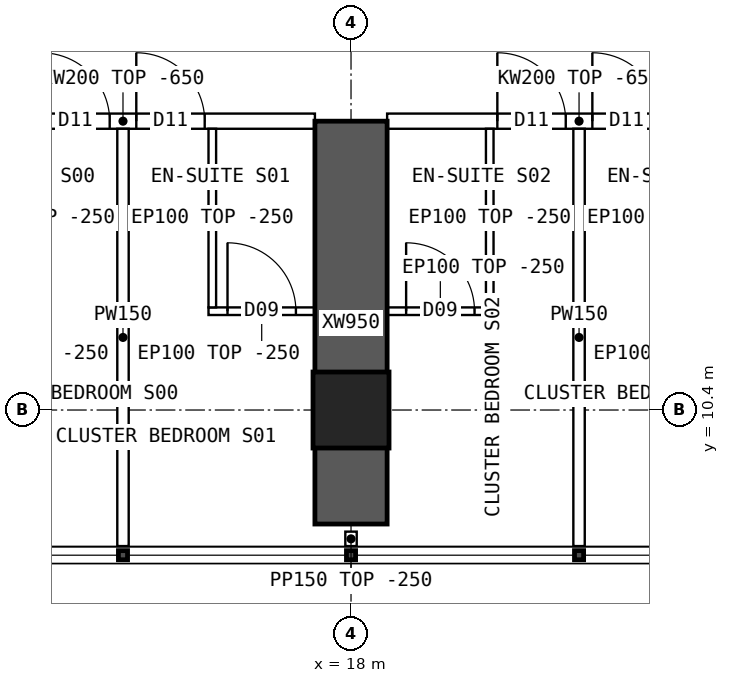
"""IFC4 building model, lengths in metres.
Left out: names, types, materials, properties, quantities, classifications, styles, units other than length and angle.
Written with IfcOpenShell. Run it as: python <this file> out.ifc"""

import sys

from ifc_helpers import new_model, si_unit, direction, frame, frame_2d, origin, origin_2d, place, context, subcontext, project, spatial, polyline, rectangle, hollow_rectangle, outline, extrude, element, fill, save


model = new_model("IFC4")
c1 = context("Model", 3, precision=1e-05, world=origin(), true_north=direction((0.0, 1.0)))
c2 = subcontext(c1, "Body", "Model", "MODEL_VIEW")
j1 = project(units=[si_unit("LENGTHUNIT", "METRE"), si_unit("PLANEANGLEUNIT", "RADIAN")], contexts=[c1])
p1 = place(None, origin())
s1 = spatial("IfcSite", under=j1, at=p1, CompositionType="ELEMENT")
p2 = place(p1, origin())
s2 = spatial("IfcBuilding", under=s1, at=p2, CompositionType="ELEMENT")
p3 = place(p2, frame((0.0, 0.0, 84.4)))
s3 = spatial("IfcBuildingStorey", under=s2, at=p3, CompositionType="ELEMENT", Elevation=84.4)
p4 = place(p3, frame((18.0, 10.4, 0.0), z_axis=(0.0, 0.0, 1.0), x_axis=(1.0, 0.0, 0.0)))
e1 = element("IfcColumn", 1, at=p4, inside=s3, PredefinedType="COLUMN", context=c2, shape_type="SweptSolid", body=[
    extrude(hollow_rectangle(XDim=1.0, YDim=1.0, WallThickness=0.1, at=origin_2d()), origin(), (0.0, 0.0, 1.0), 3.75),
])
p5 = place(p3, frame((18.0, 8.9, 0.0), z_axis=(0.0, 0.0, 1.0), x_axis=(0.0, 1.0, 0.0)))
e2 = element("IfcWall", 2, at=p5, inside=s3, PredefinedType="SHEAR", context=c2, shape_type="SweptSolid", body=[
    extrude(rectangle(XDim=5.3, YDim=0.95, at=frame_2d((2.65, 0.0))), origin(), (0.0, 0.0, 1.0), 3.75),
])
p6 = place(p3, frame((12.475, 14.2, 0.0), z_axis=(0.0, 0.0, 1.0), x_axis=(1.0, 0.0, 0.0)))
e3 = element("IfcWall", 3, at=p6, inside=s3, PredefinedType="SOLIDWALL", context=c2, shape_type="SweptSolid", body=[
    extrude(outline(polyline([(0.0, 0.0), (5.05, 0.0), (5.05, 3.1), (0.0, 3.1), (0.0, 0.0)])), frame((0.0, 0.1, 0.0), z_axis=(0.0, -1.0, 0.0), x_axis=(1.0, 0.0, 0.0)), (0.0, 0.0, 1.0), 0.2),
])
p7 = place(p6, frame((1.45, 0.0, 0.0)))
e4 = element("IfcOpeningElement", 4, at=p7, cuts=e3, PredefinedType="OPENING", context=c2, shape_type="SweptSolid", body=[
    extrude(rectangle(XDim=0.9, YDim=2.1, at=frame_2d((0.45, 1.05))), frame((0.0, 0.11, 0.0), z_axis=(0.0, -1.0, 0.0), x_axis=(1.0, 0.0, 0.0)), (0.0, 0.0, 1.0), 0.22),
])
p8 = place(p6, frame((2.7, 0.0, 0.0)))
e5 = element("IfcOpeningElement", 5, at=p8, cuts=e3, PredefinedType="OPENING", context=c2, shape_type="SweptSolid", body=[
    extrude(rectangle(XDim=0.9, YDim=2.1, at=frame_2d((0.45, 1.05))), frame((0.0, 0.11, 0.0), z_axis=(0.0, -1.0, 0.0), x_axis=(1.0, 0.0, 0.0)), (0.0, 0.0, 1.0), 0.22),
])
p9 = place(p3, frame((18.475, 14.2, 0.0), z_axis=(0.0, 0.0, 1.0), x_axis=(1.0, 0.0, 0.0)))
e6 = element("IfcWall", 6, at=p9, inside=s3, PredefinedType="SOLIDWALL", context=c2, shape_type="SweptSolid", body=[
    extrude(outline(polyline([(0.0, 0.0), (5.05, 0.0), (5.05, 3.1), (0.0, 3.1), (0.0, 0.0)])), frame((0.0, 0.1, 0.0), z_axis=(0.0, -1.0, 0.0), x_axis=(1.0, 0.0, 0.0)), (0.0, 0.0, 1.0), 0.2),
])
p10 = place(p9, frame((1.45, 0.0, 0.0)))
e7 = element("IfcOpeningElement", 7, at=p10, cuts=e6, PredefinedType="OPENING", context=c2, shape_type="SweptSolid", body=[
    extrude(rectangle(XDim=0.9, YDim=2.1, at=frame_2d((0.45, 1.05))), frame((0.0, 0.11, 0.0), z_axis=(0.0, -1.0, 0.0), x_axis=(1.0, 0.0, 0.0)), (0.0, 0.0, 1.0), 0.22),
])
p11 = place(p9, frame((2.7, 0.0, 0.0)))
e8 = element("IfcOpeningElement", 8, at=p11, cuts=e6, PredefinedType="OPENING", context=c2, shape_type="SweptSolid", body=[
    extrude(rectangle(XDim=0.9, YDim=2.1, at=frame_2d((0.45, 1.05))), frame((0.0, 0.11, 0.0), z_axis=(0.0, -1.0, 0.0), x_axis=(1.0, 0.0, 0.0)), (0.0, 0.0, 1.0), 0.22),
])
p12 = place(p3, frame((15.0, 8.61, 0.0), z_axis=(0.0, 0.0, 1.0), x_axis=(0.0, 1.0, 0.0)))
e9 = element("IfcWall", 9, at=p12, inside=s3, PredefinedType="PARTITIONING", context=c2, shape_type="SweptSolid", body=[
    extrude(outline(polyline([(0.0, 0.0), (5.49, 0.0), (5.49, 3.1), (5.442, 3.1), (5.44, 3.5), (1.992, 3.5), (1.99, 3.1), (1.592, 3.1), (1.59, 3.5), (0.0, 3.5), (0.0, 0.0)])), frame((0.0, 0.075, 0.0), z_axis=(0.0, -1.0, 0.0), x_axis=(1.0, 0.0, 0.0)), (0.0, 0.0, 1.0), 0.15),
])
p13 = place(p3, frame((17.525, 11.7, 0.0), z_axis=(0.0, 0.0, 1.0), x_axis=(-1.0, 0.0, 0.0)))
e10 = element("IfcWall", 10, at=p13, inside=s3, PredefinedType="PARTITIONING", context=c2, shape_type="SweptSolid", body=[
    extrude(rectangle(XDim=1.4, YDim=0.1, at=frame_2d((0.7, 0.0))), origin(), (0.0, 0.0, 1.0), 3.5),
])
p14 = place(p13, frame((0.25, 0.0, 0.0)))
e11 = element("IfcOpeningElement", 11, at=p14, cuts=e10, PredefinedType="OPENING", context=c2, shape_type="SweptSolid", body=[
    extrude(rectangle(XDim=0.9, YDim=2.1, at=frame_2d((0.45, 1.05))), frame((0.0, 0.06, 0.0), z_axis=(0.0, -1.0, 0.0), x_axis=(1.0, 0.0, 0.0)), (0.0, 0.0, 1.0), 0.12),
])
p15 = place(p3, frame((16.175, 11.75, 0.0), z_axis=(0.0, 0.0, 1.0), x_axis=(0.0, 1.0, 0.0)))
e12 = element("IfcWall", 12, at=p15, inside=s3, PredefinedType="PARTITIONING", context=c2, shape_type="SweptSolid", body=[
    extrude(outline(polyline([(0.0, 0.0), (2.35, 0.0), (2.35, 3.1), (2.302, 3.1), (2.3, 3.5), (0.0, 3.5), (0.0, 0.0)])), frame((0.0, 0.05, 0.0), z_axis=(0.0, -1.0, 0.0), x_axis=(1.0, 0.0, 0.0)), (0.0, 0.0, 1.0), 0.1),
])
p16 = place(p3, frame((21.0, 8.61, 0.0), z_axis=(0.0, 0.0, 1.0), x_axis=(0.0, 1.0, 0.0)))
e13 = element("IfcWall", 13, at=p16, inside=s3, PredefinedType="PARTITIONING", context=c2, shape_type="SweptSolid", body=[
    extrude(outline(polyline([(0.0, 0.0), (5.49, 0.0), (5.49, 3.1), (5.442, 3.1), (5.44, 3.5), (1.992, 3.5), (1.99, 3.1), (1.592, 3.1), (1.59, 3.5), (0.0, 3.5), (0.0, 0.0)])), frame((0.0, 0.075, 0.0), z_axis=(0.0, -1.0, 0.0), x_axis=(1.0, 0.0, 0.0)), (0.0, 0.0, 1.0), 0.15),
])
p17 = place(p3, frame((19.875, 11.7, 0.0), z_axis=(0.0, 0.0, 1.0), x_axis=(-1.0, 0.0, 0.0)))
e14 = element("IfcWall", 14, at=p17, inside=s3, PredefinedType="PARTITIONING", context=c2, shape_type="SweptSolid", body=[
    extrude(rectangle(XDim=1.4, YDim=0.1, at=frame_2d((0.7, 0.0))), origin(), (0.0, 0.0, 1.0), 3.5),
])
p18 = place(p17, frame((0.25, 0.0, 0.0)))
e15 = element("IfcOpeningElement", 15, at=p18, cuts=e14, PredefinedType="OPENING", context=c2, shape_type="SweptSolid", body=[
    extrude(rectangle(XDim=0.9, YDim=2.1, at=frame_2d((0.45, 1.05))), frame((0.0, 0.06, 0.0), z_axis=(0.0, -1.0, 0.0), x_axis=(1.0, 0.0, 0.0)), (0.0, 0.0, 1.0), 0.12),
])
p19 = place(p3, frame((19.825, 11.75, 0.0), z_axis=(0.0, 0.0, 1.0), x_axis=(0.0, 1.0, 0.0)))
e16 = element("IfcWall", 16, at=p19, inside=s3, PredefinedType="PARTITIONING", context=c2, shape_type="SweptSolid", body=[
    extrude(outline(polyline([(0.0, 0.0), (2.35, 0.0), (2.35, 3.1), (2.302, 3.1), (2.3, 3.5), (0.0, 3.5), (0.0, 0.0)])), frame((0.0, 0.05, 0.0), z_axis=(0.0, -1.0, 0.0), x_axis=(1.0, 0.0, 0.0)), (0.0, 0.0, 1.0), 0.1),
])
p20 = place(p3, frame((18.0, 8.8, 0.0), z_axis=(0.0, 0.0, 1.0), x_axis=(0.0, -1.0, 0.0)))
e17 = element("IfcWall", 17, at=p20, inside=s3, PredefinedType="PARTITIONING", context=c2, shape_type="SweptSolid", body=[
    extrude(rectangle(XDim=0.19, YDim=0.15, at=frame_2d((0.095, 0.0))), origin(), (0.0, 0.0, 1.0), 3.5),
])
p21 = place(p7, origin())
e18 = element("IfcDoor", 18, at=p21, inside=s3, OperationType="SINGLE_SWING_LEFT", PredefinedType="DOOR", context=c2, shape_type="SweptSolid", body=[
    extrude(rectangle(XDim=0.9, YDim=2.1, at=frame_2d((0.45, 1.05))), frame((0.0, 0.025, 0.0), z_axis=(0.0, -1.0, 0.0), x_axis=(1.0, 0.0, 0.0)), (0.0, 0.0, 1.0), 0.05),
])
fill(e4, e18)
p22 = place(p14, origin())
e19 = element("IfcDoor", 19, at=p22, inside=s3, OperationType="SINGLE_SWING_RIGHT", PredefinedType="DOOR", context=c2, shape_type="SweptSolid", body=[
    extrude(rectangle(XDim=0.9, YDim=2.1, at=frame_2d((0.45, 1.05))), frame((0.0, 0.025, 0.0), z_axis=(0.0, -1.0, 0.0), x_axis=(1.0, 0.0, 0.0)), (0.0, 0.0, 1.0), 0.05),
])
fill(e11, e19)
p23 = place(p8, origin())
e20 = element("IfcDoor", 20, at=p23, inside=s3, OperationType="SINGLE_SWING_LEFT", PredefinedType="DOOR", context=c2, shape_type="SweptSolid", body=[
    extrude(rectangle(XDim=0.9, YDim=2.1, at=frame_2d((0.45, 1.05))), frame((0.0, 0.025, 0.0), z_axis=(0.0, -1.0, 0.0), x_axis=(1.0, 0.0, 0.0)), (0.0, 0.0, 1.0), 0.05),
])
fill(e5, e20)
p24 = place(p18, origin())
e21 = element("IfcDoor", 21, at=p24, inside=s3, OperationType="SINGLE_SWING_RIGHT", PredefinedType="DOOR", context=c2, shape_type="SweptSolid", body=[
    extrude(rectangle(XDim=0.9, YDim=2.1, at=frame_2d((0.45, 1.05))), frame((0.0, 0.025, 0.0), z_axis=(0.0, -1.0, 0.0), x_axis=(1.0, 0.0, 0.0)), (0.0, 0.0, 1.0), 0.05),
])
fill(e15, e21)
p25 = place(p10, origin())
e22 = element("IfcDoor", 22, at=p25, inside=s3, OperationType="SINGLE_SWING_LEFT", PredefinedType="DOOR", context=c2, shape_type="SweptSolid", body=[
    extrude(rectangle(XDim=0.9, YDim=2.1, at=frame_2d((0.45, 1.05))), frame((0.0, 0.025, 0.0), z_axis=(0.0, -1.0, 0.0), x_axis=(1.0, 0.0, 0.0)), (0.0, 0.0, 1.0), 0.05),
])
fill(e7, e22)
p26 = place(p11, origin())
e23 = element("IfcDoor", 23, at=p26, inside=s3, OperationType="SINGLE_SWING_LEFT", PredefinedType="DOOR", context=c2, shape_type="SweptSolid", body=[
    extrude(rectangle(XDim=0.9, YDim=2.1, at=frame_2d((0.45, 1.05))), frame((0.0, 0.025, 0.0), z_axis=(0.0, -1.0, 0.0), x_axis=(1.0, 0.0, 0.0)), (0.0, 0.0, 1.0), 0.05),
])
fill(e8, e23)
save(model, sys.argv[1])
